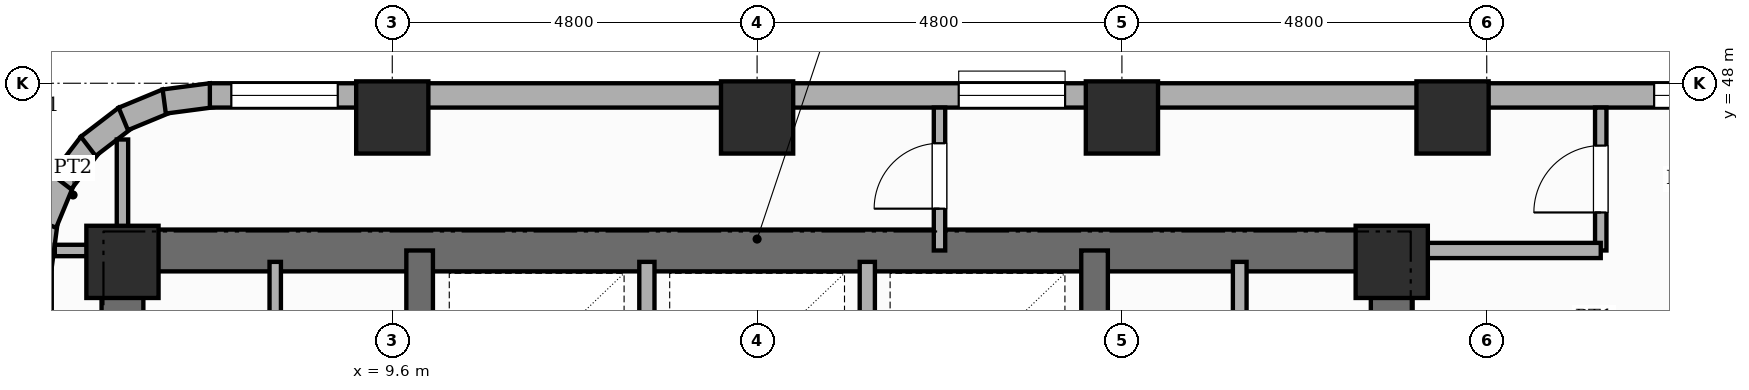
"""IFC4 building model, lengths in metres.
Left out: names, types, materials, properties, quantities, classifications, styles, units other than length and angle.
Written with IfcOpenShell. Run it as: python <this file> out.ifc"""

import sys

from ifc_helpers import new_model, si_unit, direction, frame, frame_2d, origin, origin_2d, place, context, subcontext, project, spatial, rectangle, extrude, element, fill, save


model = new_model("IFC4")
c1 = context("Model", 3, precision=1e-05, world=origin(), true_north=direction((0.0, 1.0)))
c2 = subcontext(c1, "Body", "Model", "MODEL_VIEW")
j1 = project(units=[si_unit("LENGTHUNIT", "METRE"), si_unit("PLANEANGLEUNIT", "RADIAN")], contexts=[c1])
p1 = place(None, origin())
s1 = spatial("IfcSite", under=j1, at=p1, CompositionType="ELEMENT")
p2 = place(p1, origin())
s2 = spatial("IfcBuilding", under=s1, at=p2, CompositionType="ELEMENT")
p3 = place(p2, frame((0.0, 0.0, 107.2)))
s3 = spatial("IfcBuildingStorey", under=s2, at=p3, CompositionType="ELEMENT", Elevation=107.2)
p4 = place(p3, frame((6.05, 30.625, 0.0), z_axis=(0.0, 0.0, 1.0), x_axis=(0.0, 1.0, 0.0)))
e1 = element("IfcWall", 1, at=p4, inside=s3, PredefinedType="SHEAR", context=c2, shape_type="SweptSolid", body=[
    extrude(rectangle(XDim=15.45, YDim=0.55, at=frame_2d((7.725, 0.0))), origin(), (0.0, 0.0, 1.0), 3.6),
])
p5 = place(p4, frame((10.725, 0.0, 0.0)))
e2 = element("IfcOpeningElement", 2, at=p5, cuts=e1, PredefinedType="OPENING", context=c2, shape_type="SweptSolid", body=[
    extrude(rectangle(XDim=0.95, YDim=2.15, at=frame_2d((0.475, 1.075))), frame((0.0, 0.285, 0.0), z_axis=(0.0, -1.0, 0.0), x_axis=(1.0, 0.0, 0.0)), (0.0, 0.0, 1.0), 0.57),
])
p6 = place(p3, frame((22.75, 30.625, 0.0), z_axis=(0.0, 0.0, 1.0), x_axis=(0.0, 1.0, 0.0)))
e3 = element("IfcWall", 3, at=p6, inside=s3, PredefinedType="SHEAR", context=c2, shape_type="SweptSolid", body=[
    extrude(rectangle(XDim=15.45, YDim=0.55, at=frame_2d((7.725, 0.0))), origin(), (0.0, 0.0, 1.0), 3.6),
])
p7 = place(p6, frame((10.725, 0.0, 0.0)))
e4 = element("IfcOpeningElement", 4, at=p7, cuts=e3, PredefinedType="OPENING", context=c2, shape_type="SweptSolid", body=[
    extrude(rectangle(XDim=1.0, YDim=2.15, at=frame_2d((0.5, 1.075))), frame((0.0, 0.285, 0.0), z_axis=(0.0, -1.0, 0.0), x_axis=(1.0, 0.0, 0.0)), (0.0, 0.0, 1.0), 0.57),
])
p8 = place(p3, frame((6.05, 45.8, 0.0), z_axis=(0.0, 0.0, 1.0), x_axis=(1.0, 0.0, 0.0)))
e5 = element("IfcWall", 5, at=p8, inside=s3, PredefinedType="SHEAR", context=c2, shape_type="SweptSolid", body=[
    extrude(rectangle(XDim=16.7, YDim=0.55, at=frame_2d((8.35, 0.0))), origin(), (0.0, 0.0, 1.0), 3.6),
])
p9 = place(p3, frame((9.96, 30.9, 0.0), z_axis=(0.0, 0.0, 1.0), x_axis=(0.0, 1.0, 0.0)))
e6 = element("IfcWall", 6, at=p9, inside=s3, PredefinedType="SHEAR", context=c2, shape_type="SweptSolid", body=[
    extrude(rectangle(XDim=14.9, YDim=0.35, at=frame_2d((7.45, 0.0))), origin(), (0.0, 0.0, 1.0), 3.6),
])
p10 = place(p9, frame((0.65, 0.0, 0.0)))
e7 = element("IfcOpeningElement", 7, at=p10, cuts=e6, PredefinedType="OPENING", context=c2, shape_type="SweptSolid", body=[
    extrude(rectangle(XDim=0.95, YDim=2.1, at=frame_2d((0.475, 1.05))), frame((0.0, 0.185, 0.0), z_axis=(0.0, -1.0, 0.0), x_axis=(1.0, 0.0, 0.0)), (0.0, 0.0, 1.0), 0.37),
])
p11 = place(p9, frame((10.45, 0.0, 0.0)))
e8 = element("IfcOpeningElement", 8, at=p11, cuts=e6, PredefinedType="OPENING", context=c2, shape_type="SweptSolid", body=[
    extrude(rectangle(XDim=1.0, YDim=2.15, at=frame_2d((0.5, 1.075))), frame((0.0, 0.185, 0.0), z_axis=(0.0, -1.0, 0.0), x_axis=(1.0, 0.0, 0.0)), (0.0, 0.0, 1.0), 0.37),
])
p12 = place(p3, frame((18.84, 30.9, 0.0), z_axis=(0.0, 0.0, 1.0), x_axis=(0.0, 1.0, 0.0)))
e9 = element("IfcWall", 9, at=p12, inside=s3, PredefinedType="SHEAR", context=c2, shape_type="SweptSolid", body=[
    extrude(rectangle(XDim=14.9, YDim=0.35, at=frame_2d((7.45, 0.0))), origin(), (0.0, 0.0, 1.0), 3.6),
])
p13 = place(p12, frame((0.65, 0.0, 0.0)))
e10 = element("IfcOpeningElement", 10, at=p13, cuts=e9, PredefinedType="OPENING", context=c2, shape_type="SweptSolid", body=[
    extrude(rectangle(XDim=0.95, YDim=2.1, at=frame_2d((0.475, 1.05))), frame((0.0, 0.185, 0.0), z_axis=(0.0, -1.0, 0.0), x_axis=(1.0, 0.0, 0.0)), (0.0, 0.0, 1.0), 0.37),
])
p14 = place(p12, frame((10.45, 0.0, 0.0)))
e11 = element("IfcOpeningElement", 11, at=p14, cuts=e9, PredefinedType="OPENING", context=c2, shape_type="SweptSolid", body=[
    extrude(rectangle(XDim=1.0, YDim=2.15, at=frame_2d((0.5, 1.075))), frame((0.0, 0.185, 0.0), z_axis=(0.0, -1.0, 0.0), x_axis=(1.0, 0.0, 0.0)), (0.0, 0.0, 1.0), 0.37),
])
for number, where, z_axis, x_axis in (
    (12, (6.05, 45.65, 0.0), (0.0, 0.0, 1.0), (1.0, 0.0, 0.0)),
    (13, (9.6, 47.55, 0.0), (0.0, 0.0, 1.0), (1.0, 0.0, 0.0)),
    (14, (14.4, 47.55, 0.0), (0.0, 0.0, 1.0), (1.0, 0.0, 0.0)),
    (15, (19.2, 47.55, 0.0), (0.0, 0.0, 1.0), (1.0, 0.0, 0.0)),
    (16, (22.75, 45.65, 0.0), (0.0, 0.0, 1.0), (1.0, 0.0, 0.0)),
    (17, (23.55, 47.55, 0.0), (0.0, 0.0, 1.0), (1.0, 0.0, 0.0)),
):
    element("IfcColumn", number, at=place(p3, frame(where, z_axis=z_axis, x_axis=x_axis)), inside=s3, PredefinedType="COLUMN", context=c2, shape_type="SweptSolid", body=[
        extrude(rectangle(XDim=0.95, YDim=0.95, at=origin_2d()), origin(), (0.0, 0.0, 1.0), 3.6),
    ])
for number, where, z_axis, x_axis in (
    (18, (4.958, 45.579, 0.0), (0.0, 0.0, 1.0), (0.131, 0.991, 0.0)),
    (19, (5.03, 46.16, 0.0), (0.0, 0.0, 1.0), (0.383, 0.924, 0.0)),
):
    element("IfcWall", number, at=place(p3, frame(where, z_axis=z_axis, x_axis=x_axis)), inside=s3, PredefinedType="STANDARD", context=c2, shape_type="SweptSolid", body=[
        extrude(rectangle(XDim=0.626, YDim=0.32, at=frame_2d((0.313, 0.0))), origin(), (0.0, 0.0, 1.0), 3.36),
    ])
p15 = place(p3, frame((5.248, 46.703, 0.0), z_axis=(0.0, 0.0, 1.0), x_axis=(0.608938521285, 0.7932174212, 0.0)))
e20 = element("IfcWall", 20, at=p15, inside=s3, PredefinedType="STANDARD", context=c2, shape_type="SweptSolid", body=[
    extrude(rectangle(XDim=0.627, YDim=0.32, at=frame_2d((0.313, 0.0))), origin(), (0.0, 0.0, 1.0), 3.36),
])
p16 = place(p3, frame((5.6, 47.17, 0.0), z_axis=(0.0, 0.0, 1.0), x_axis=(0.793405610854, 0.608693302629, 0.0)))
e21 = element("IfcWall", 21, at=p16, inside=s3, PredefinedType="STANDARD", context=c2, shape_type="SweptSolid", body=[
    extrude(rectangle(XDim=0.626, YDim=0.32, at=frame_2d((0.313, 0.0))), origin(), (0.0, 0.0, 1.0), 3.36),
])
p17 = place(p3, frame((6.061, 47.531, 0.0), z_axis=(0.0, 0.0, 1.0), x_axis=(0.923836271867, 0.382787856107, 0.0)))
e22 = element("IfcWall", 22, at=p17, inside=s3, PredefinedType="STANDARD", context=c2, shape_type="SweptSolid", body=[
    extrude(rectangle(XDim=0.626, YDim=0.32, at=frame_2d((0.313, 0.0))), origin(), (0.0, 0.0, 1.0), 3.36),
])
p18 = place(p3, frame((6.6, 47.76, 0.0), z_axis=(0.0, 0.0, 1.0), x_axis=(0.991447664465, 0.130504898859, 0.0)))
e23 = element("IfcWall", 23, at=p18, inside=s3, PredefinedType="STANDARD", context=c2, shape_type="SweptSolid", body=[
    extrude(rectangle(XDim=0.627, YDim=0.32, at=frame_2d((0.313, 0.0))), origin(), (0.0, 0.0, 1.0), 3.36),
])
p19 = place(p3, frame((7.2, 47.84, 0.0), z_axis=(0.0, 0.0, 1.0), x_axis=(1.0, 0.0, 0.0)))
e24 = element("IfcWall", 24, at=p19, inside=s3, PredefinedType="STANDARD", context=c2, shape_type="SweptSolid", body=[
    extrude(rectangle(XDim=43.2, YDim=0.32, at=frame_2d((21.6, 0.0))), origin(), (0.0, 0.0, 1.0), 2.54),
])
p20 = place(p19, frame((19.002, 0.0, 0.65)))
e25 = element("IfcOpeningElement", 25, at=p20, cuts=e24, PredefinedType="OPENING", context=c2, shape_type="SweptSolid", body=[
    extrude(rectangle(XDim=1.4, YDim=1.1, at=frame_2d((0.7, 0.55))), frame((0.0, 0.17, 0.0), z_axis=(0.0, -1.0, 0.0), x_axis=(1.0, 0.0, 0.0)), (0.0, 0.0, 1.0), 0.34),
])
p21 = place(p19, frame((0.282, 0.0, 0.65)))
e26 = element("IfcOpeningElement", 26, at=p21, cuts=e24, PredefinedType="OPENING", context=c2, shape_type="SweptSolid", body=[
    extrude(rectangle(XDim=1.4, YDim=1.1, at=frame_2d((0.7, 0.55))), frame((0.0, 0.17, 0.0), z_axis=(0.0, -1.0, 0.0), x_axis=(1.0, 0.0, 0.0)), (0.0, 0.0, 1.0), 0.34),
])
p22 = place(p19, frame((9.853, 0.0, 0.65)))
e27 = element("IfcOpeningElement", 27, at=p22, cuts=e24, PredefinedType="OPENING", context=c2, shape_type="SweptSolid", body=[
    extrude(rectangle(XDim=1.4, YDim=1.1, at=frame_2d((0.7, 0.55))), frame((0.0, 0.17, 0.0), z_axis=(0.0, -1.0, 0.0), x_axis=(1.0, 0.0, 0.0)), (0.0, 0.0, 1.0), 0.34),
])
for number, where, z_axis, x_axis in (
    (28, (12.95, 43.1, 0.0), (0.0, 0.0, 1.0), (0.0, 1.0, 0.0)),
    (29, (15.85, 43.1, 0.0), (0.0, 0.0, 1.0), (0.0, 1.0, 0.0)),
):
    element("IfcWall", number, at=place(p3, frame(where, z_axis=z_axis, x_axis=x_axis)), inside=s3, PredefinedType="POLYGONAL", context=c2, shape_type="SweptSolid", body=[
        extrude(rectangle(XDim=2.55, YDim=0.2, at=frame_2d((1.275, 0.0))), origin(), (0.0, 0.0, 1.0), 3.36),
    ])
p23 = place(p3, frame((8.06, 43.05, 0.0), z_axis=(0.0, 0.0, 1.0), x_axis=(0.0, 1.0, 0.0)))
e30 = element("IfcWall", 30, at=p23, inside=s3, PredefinedType="PARTITIONING", context=c2, shape_type="SweptSolid", body=[
    extrude(rectangle(XDim=2.6, YDim=0.15, at=frame_2d((1.3, 0.0))), origin(), (0.0, 0.0, 1.0), 3.36),
])
p24 = place(p3, frame((20.75, 43.05, 0.0), z_axis=(0.0, 0.0, 1.0), x_axis=(0.0, 1.0, 0.0)))
e31 = element("IfcWall", 31, at=p24, inside=s3, PredefinedType="PLUMBINGWALL", context=c2, shape_type="SweptSolid", body=[
    extrude(rectangle(XDim=2.6, YDim=0.18, at=frame_2d((1.3, 0.0))), origin(), (0.0, 0.0, 1.0), 3.36),
])
p25 = place(p3, frame((5.16, 45.8, 0.0), z_axis=(0.0, 0.0, 1.0), x_axis=(1.0, 0.0, 0.0)))
e32 = element("IfcWall", 32, at=p25, inside=s3, PredefinedType="PARTITIONING", context=c2, shape_type="SweptSolid", body=[
    extrude(rectangle(XDim=0.89, YDim=0.15, at=frame_2d((0.445, 0.0))), origin(), (0.0, 0.0, 1.0), 3.36),
])
p26 = place(p3, frame((25.5, 45.8, 0.0), z_axis=(0.0, 0.0, 1.0), x_axis=(0.0, 1.0, 0.0)))
e33 = element("IfcWall", 33, at=p26, inside=s3, PredefinedType="PARTITIONING", context=c2, shape_type="SweptSolid", body=[
    extrude(rectangle(XDim=1.88, YDim=0.15, at=frame_2d((0.94, 0.0))), origin(), (0.0, 0.0, 1.0), 3.36),
])
p27 = place(p26, frame((0.5, 0.0, 0.0)))
e34 = element("IfcOpeningElement", 34, at=p27, cuts=e33, PredefinedType="OPENING", context=c2, shape_type="SweptSolid", body=[
    extrude(rectangle(XDim=0.88, YDim=2.1, at=frame_2d((0.44, 1.05))), frame((0.0, 0.085, 0.0), z_axis=(0.0, -1.0, 0.0), x_axis=(1.0, 0.0, 0.0)), (0.0, 0.0, 1.0), 0.17),
])
p28 = place(p3, frame((22.75, 45.8, 0.0), z_axis=(0.0, 0.0, 1.0), x_axis=(1.0, 0.0, 0.0)))
e35 = element("IfcWall", 35, at=p28, inside=s3, PredefinedType="PARTITIONING", context=c2, shape_type="SweptSolid", body=[
    extrude(rectangle(XDim=2.75, YDim=0.2, at=frame_2d((1.375, 0.0))), origin(), (0.0, 0.0, 1.0), 3.36),
])
p29 = place(p3, frame((6.05, 45.8, 0.0), z_axis=(0.0, 0.0, 1.0), x_axis=(0.0, 1.0, 0.0)))
e36 = element("IfcWall", 36, at=p29, inside=s3, PredefinedType="PARTITIONING", context=c2, shape_type="SweptSolid", body=[
    extrude(rectangle(XDim=1.46, YDim=0.15, at=frame_2d((0.73, 0.0))), origin(), (0.0, 0.0, 1.0), 3.36),
])
p30 = place(p3, frame((16.8, 45.8, 0.0), z_axis=(0.0, 0.0, 1.0), x_axis=(0.0, 1.0, 0.0)))
e37 = element("IfcWall", 37, at=p30, inside=s3, PredefinedType="PARTITIONING", context=c2, shape_type="SweptSolid", body=[
    extrude(rectangle(XDim=1.88, YDim=0.15, at=frame_2d((0.94, 0.0))), origin(), (0.0, 0.0, 1.0), 3.36),
])
p31 = place(p30, frame((0.55, 0.0, 0.0)))
e38 = element("IfcOpeningElement", 38, at=p31, cuts=e37, PredefinedType="OPENING", context=c2, shape_type="SweptSolid", body=[
    extrude(rectangle(XDim=0.86, YDim=2.1, at=frame_2d((0.43, 1.05))), frame((0.0, 0.085, 0.0), z_axis=(0.0, -1.0, 0.0), x_axis=(1.0, 0.0, 0.0)), (0.0, 0.0, 1.0), 0.17),
])
p32 = place(p20, origin())
e39 = element("IfcWindow", 39, at=p32, inside=s3, PartitioningType="SINGLE_PANEL", PredefinedType="WINDOW", context=c2, shape_type="SweptSolid", body=[
    extrude(rectangle(XDim=1.4, YDim=1.1, at=frame_2d((0.7, 0.55))), frame((0.0, 0.03, 0.0), z_axis=(0.0, -1.0, 0.0), x_axis=(1.0, 0.0, 0.0)), (0.0, 0.0, 1.0), 0.06),
])
fill(e25, e39)
p33 = place(p21, origin())
e40 = element("IfcWindow", 40, at=p33, inside=s3, PartitioningType="SINGLE_PANEL", PredefinedType="WINDOW", context=c2, shape_type="SweptSolid", body=[
    extrude(rectangle(XDim=1.4, YDim=1.1, at=frame_2d((0.7, 0.55))), frame((0.0, 0.03, 0.0), z_axis=(0.0, -1.0, 0.0), x_axis=(1.0, 0.0, 0.0)), (0.0, 0.0, 1.0), 0.06),
])
fill(e26, e40)
p34 = place(p22, origin())
e41 = element("IfcWindow", 41, at=p34, inside=s3, PartitioningType="SINGLE_PANEL", PredefinedType="WINDOW", context=c2, shape_type="SweptSolid", body=[
    extrude(rectangle(XDim=1.4, YDim=1.1, at=frame_2d((0.7, 0.55))), frame((0.0, 0.03, 0.0), z_axis=(0.0, -1.0, 0.0), x_axis=(1.0, 0.0, 0.0)), (0.0, 0.0, 1.0), 0.06),
])
fill(e27, e41)
p35 = place(p27, origin())
e42 = element("IfcDoor", 42, at=p35, inside=s3, OperationType="SINGLE_SWING_LEFT", PredefinedType="DOOR", context=c2, shape_type="SweptSolid", body=[
    extrude(rectangle(XDim=0.88, YDim=2.1, at=frame_2d((0.44, 1.05))), frame((0.0, 0.025, 0.0), z_axis=(0.0, -1.0, 0.0), x_axis=(1.0, 0.0, 0.0)), (0.0, 0.0, 1.0), 0.05),
])
fill(e34, e42)
p36 = place(p31, origin())
e43 = element("IfcDoor", 43, at=p36, inside=s3, OperationType="SINGLE_SWING_LEFT", PredefinedType="DOOR", context=c2, shape_type="SweptSolid", body=[
    extrude(rectangle(XDim=0.86, YDim=2.1, at=frame_2d((0.43, 1.05))), frame((0.0, 0.025, 0.0), z_axis=(0.0, -1.0, 0.0), x_axis=(1.0, 0.0, 0.0)), (0.0, 0.0, 1.0), 0.05),
])
fill(e38, e43)
save(model, sys.argv[1])
